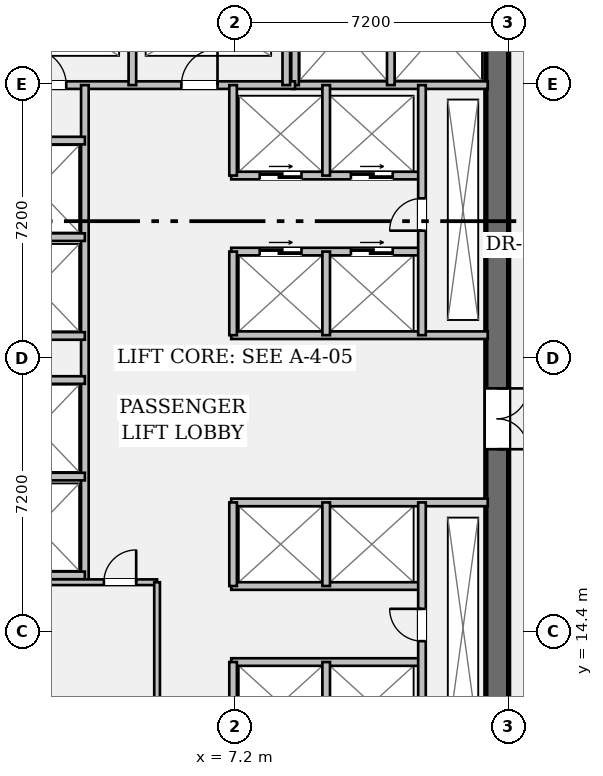
"""IFC4 building model, lengths in metres.
Left out: names, types, materials, properties, quantities, classifications, styles, units other than length and angle.
Written with IfcOpenShell. Run it as: python <this file> out.ifc"""

import sys

from ifc_helpers import new_model, si_unit, direction, frame, frame_2d, origin, place, context, subcontext, project, spatial, rectangle, extrude, element, fill, save


model = new_model("IFC4")
c1 = context("Model", 3, precision=1e-05, world=origin(), true_north=direction((0.0, 1.0)))
c2 = subcontext(c1, "Body", "Model", "MODEL_VIEW")
j1 = project(units=[si_unit("LENGTHUNIT", "METRE"), si_unit("PLANEANGLEUNIT", "RADIAN")], contexts=[c1])
p1 = place(None, origin())
s1 = spatial("IfcSite", under=j1, at=p1, CompositionType="ELEMENT")
p2 = place(p1, origin())
s2 = spatial("IfcBuilding", under=s1, at=p2, CompositionType="ELEMENT")
p3 = place(p2, frame((0.0, 0.0, 73.5)))
s3 = spatial("IfcBuildingStorey", under=s2, at=p3, CompositionType="ELEMENT", Elevation=73.5)
p4 = place(p3, frame((14.1, 35.4, 0.0), z_axis=(0.0, 0.0, 1.0), x_axis=(0.0, -1.0, 0.0)))
e1 = element("IfcWall", 1, at=p4, inside=s3, PredefinedType="SHEAR", context=c2, shape_type="SweptSolid", body=[
    extrude(rectangle(XDim=27.6, YDim=0.6, at=frame_2d((13.8, 0.0))), origin(), (0.0, 0.0, 1.0), 3.57),
])
p5 = place(p4, frame((1.3, 0.0, 0.0)))
e2 = element("IfcOpeningElement", 2, at=p5, cuts=e1, PredefinedType="OPENING", context=c2, shape_type="SweptSolid", body=[
    extrude(rectangle(XDim=1.2, YDim=2.15, at=frame_2d((0.6, 1.075))), frame((0.0, 0.312, 0.0), z_axis=(0.0, -1.0, 0.0), x_axis=(1.0, 0.0, 0.0)), (0.0, 0.0, 1.0), 0.624),
])
p6 = place(p4, frame((25.25, 0.0, 0.0)))
e3 = element("IfcOpeningElement", 3, at=p6, cuts=e1, PredefinedType="OPENING", context=c2, shape_type="SweptSolid", body=[
    extrude(rectangle(XDim=1.2, YDim=2.15, at=frame_2d((0.6, 1.075))), frame((0.0, 0.312, 0.0), z_axis=(0.0, -1.0, 0.0), x_axis=(1.0, 0.0, 0.0)), (0.0, 0.0, 1.0), 0.624),
])
p7 = place(p4, frame((14.6, 0.0, 0.0)))
e4 = element("IfcOpeningElement", 4, at=p7, cuts=e1, PredefinedType="OPENING", context=c2, shape_type="SweptSolid", body=[
    extrude(rectangle(XDim=1.6, YDim=2.2, at=frame_2d((0.8, 1.1))), frame((0.0, 0.312, 0.0), z_axis=(0.0, -1.0, 0.0), x_axis=(1.0, 0.0, 0.0)), (0.0, 0.0, 1.0), 0.624),
])
p8 = place(p3, frame((8.7, 28.78, 0.0), z_axis=(0.0, 0.0, 1.0), x_axis=(1.0, 0.0, 0.0)))
e5 = element("IfcWall", 5, at=p8, inside=s3, PredefinedType="PARTITIONING", context=c2, shape_type="SweptSolid", body=[
    extrude(rectangle(XDim=5.15, YDim=0.2, at=frame_2d((2.575, 0.0))), origin(), (0.0, 0.0, 1.0), 3.57),
])
for number, where, z_axis, x_axis in (
    (6, (8.78, 28.78, 0.0), (0.0, 0.0, 1.0), (0.0, 1.0, 0.0)),
    (7, (11.3, 28.78, 0.0), (0.0, 0.0, 1.0), (0.0, 1.0, 0.0)),
):
    element("IfcWall", number, at=place(p3, frame(where, z_axis=z_axis, x_axis=x_axis)), inside=s3, PredefinedType="PARTITIONING", context=c2, shape_type="SweptSolid", body=[
        extrude(rectangle(XDim=3.1, YDim=0.2, at=frame_2d((1.55, 0.0))), origin(), (0.0, 0.0, 1.0), 3.57),
    ])
p9 = place(p3, frame((0.6, 28.78, 0.0), z_axis=(0.0, 0.0, 1.0), x_axis=(1.0, 0.0, 0.0)))
e8 = element("IfcWall", 8, at=p9, inside=s3, PredefinedType="PARTITIONING", context=c2, shape_type="SweptSolid", body=[
    extrude(rectangle(XDim=8.18, YDim=0.2, at=frame_2d((4.09, 0.0))), origin(), (0.0, 0.0, 1.0), 3.57),
])
p10 = place(p9, frame((1.21, 0.0, 0.0)))
e9 = element("IfcOpeningElement", 9, at=p10, cuts=e8, PredefinedType="OPENING", context=c2, shape_type="SweptSolid", body=[
    extrude(rectangle(XDim=0.95, YDim=2.15, at=frame_2d((0.475, 1.075))), frame((0.0, 0.112, 0.0), z_axis=(0.0, -1.0, 0.0), x_axis=(1.0, 0.0, 0.0)), (0.0, 0.0, 1.0), 0.224),
])
p11 = place(p9, frame((5.19, 0.0, 0.0)))
e10 = element("IfcOpeningElement", 10, at=p11, cuts=e8, PredefinedType="OPENING", context=c2, shape_type="SweptSolid", body=[
    extrude(rectangle(XDim=0.95, YDim=2.15, at=frame_2d((0.475, 1.075))), frame((0.0, 0.112, 0.0), z_axis=(0.0, -1.0, 0.0), x_axis=(1.0, 0.0, 0.0)), (0.0, 0.0, 1.0), 0.224),
])
for number, where, z_axis, x_axis in (
    (11, (4.5, 28.78, 0.0), (0.0, 0.0, 1.0), (0.0, 1.0, 0.0)),
    (12, (8.55, 28.78, 0.0), (0.0, 0.0, 1.0), (0.0, 1.0, 0.0)),
):
    element("IfcWall", number, at=place(p3, frame(where, z_axis=z_axis, x_axis=x_axis)), inside=s3, PredefinedType="PARTITIONING", context=c2, shape_type="SweptSolid", body=[
        extrude(rectangle(XDim=2.94, YDim=0.2, at=frame_2d((1.47, 0.0))), origin(), (0.0, 0.0, 1.0), 3.57),
    ])
p12 = place(p3, frame((3.25, 15.7, 0.0), z_axis=(0.0, 0.0, 1.0), x_axis=(0.0, 1.0, 0.0)))
e13 = element("IfcWall", 13, at=p12, inside=s3, PredefinedType="PARTITIONING", context=c2, shape_type="SweptSolid", body=[
    extrude(rectangle(XDim=13.08, YDim=0.2, at=frame_2d((6.54, 0.0))), origin(), (0.0, 0.0, 1.0), 3.57),
])
for number, where, z_axis, x_axis in (
    (14, (0.6, 15.88, 0.0), (0.0, 0.0, 1.0), (1.0, 0.0, 0.0)),
    (15, (0.6, 18.48, 0.0), (0.0, 0.0, 1.0), (1.0, 0.0, 0.0)),
    (16, (0.6, 22.18, 0.0), (0.0, 0.0, 1.0), (1.0, 0.0, 0.0)),
    (17, (0.6, 24.78, 0.0), (0.0, 0.0, 1.0), (1.0, 0.0, 0.0)),
    (18, (0.6, 21.02, 0.0), (0.0, 0.0, 1.0), (1.0, 0.0, 0.0)),
    (19, (0.6, 27.32, 0.0), (0.0, 0.0, 1.0), (1.0, 0.0, 0.0)),
):
    element("IfcWall", number, at=place(p3, frame(where, z_axis=z_axis, x_axis=x_axis)), inside=s3, PredefinedType="PARTITIONING", context=c2, shape_type="SweptSolid", body=[
        extrude(rectangle(XDim=2.65, YDim=0.2, at=frame_2d((1.325, 0.0))), origin(), (0.0, 0.0, 1.0), 3.57),
    ])
p13 = place(p3, frame((7.1, 22.2, 0.0), z_axis=(0.0, 0.0, 1.0), x_axis=(1.0, 0.0, 0.0)))
e20 = element("IfcWall", 20, at=p13, inside=s3, PredefinedType="PARTITIONING", context=c2, shape_type="SweptSolid", body=[
    extrude(rectangle(XDim=6.75, YDim=0.2, at=frame_2d((3.375, 0.0))), origin(), (0.0, 0.0, 1.0), 3.57),
])
p14 = place(p3, frame((7.1, 24.4, 0.0), z_axis=(0.0, 0.0, 1.0), x_axis=(1.0, 0.0, 0.0)))
e21 = element("IfcWall", 21, at=p14, inside=s3, PredefinedType="PARTITIONING", context=c2, shape_type="SweptSolid", body=[
    extrude(rectangle(XDim=5.02, YDim=0.2, at=frame_2d((2.51, 0.0))), origin(), (0.0, 0.0, 1.0), 3.57),
])
p15 = place(p14, frame((0.75, 0.0, 0.0)))
e22 = element("IfcOpeningElement", 22, at=p15, cuts=e21, PredefinedType="OPENING", context=c2, shape_type="SweptSolid", body=[
    extrude(rectangle(XDim=1.1, YDim=2.2, at=frame_2d((0.55, 1.1))), frame((0.0, 0.112, 0.0), z_axis=(0.0, -1.0, 0.0), x_axis=(1.0, 0.0, 0.0)), (0.0, 0.0, 1.0), 0.224),
])
p16 = place(p14, frame((3.15, 0.0, 0.0)))
e23 = element("IfcOpeningElement", 23, at=p16, cuts=e21, PredefinedType="OPENING", context=c2, shape_type="SweptSolid", body=[
    extrude(rectangle(XDim=1.1, YDim=2.2, at=frame_2d((0.55, 1.1))), frame((0.0, 0.112, 0.0), z_axis=(0.0, -1.0, 0.0), x_axis=(1.0, 0.0, 0.0)), (0.0, 0.0, 1.0), 0.224),
])
p17 = place(p3, frame((7.1, 26.4, 0.0), z_axis=(0.0, 0.0, 1.0), x_axis=(1.0, 0.0, 0.0)))
e24 = element("IfcWall", 24, at=p17, inside=s3, PredefinedType="PARTITIONING", context=c2, shape_type="SweptSolid", body=[
    extrude(rectangle(XDim=5.02, YDim=0.2, at=frame_2d((2.51, 0.0))), origin(), (0.0, 0.0, 1.0), 3.57),
])
p18 = place(p17, frame((0.75, 0.0, 0.0)))
e25 = element("IfcOpeningElement", 25, at=p18, cuts=e24, PredefinedType="OPENING", context=c2, shape_type="SweptSolid", body=[
    extrude(rectangle(XDim=1.1, YDim=2.2, at=frame_2d((0.55, 1.1))), frame((0.0, 0.112, 0.0), z_axis=(0.0, -1.0, 0.0), x_axis=(1.0, 0.0, 0.0)), (0.0, 0.0, 1.0), 0.224),
])
p19 = place(p17, frame((3.15, 0.0, 0.0)))
e26 = element("IfcOpeningElement", 26, at=p19, cuts=e24, PredefinedType="OPENING", context=c2, shape_type="SweptSolid", body=[
    extrude(rectangle(XDim=1.1, YDim=2.2, at=frame_2d((0.55, 1.1))), frame((0.0, 0.112, 0.0), z_axis=(0.0, -1.0, 0.0), x_axis=(1.0, 0.0, 0.0)), (0.0, 0.0, 1.0), 0.224),
])
p20 = place(p3, frame((7.15, 22.2, 0.0), z_axis=(0.0, 0.0, 1.0), x_axis=(0.0, 1.0, 0.0)))
e27 = element("IfcWall", 27, at=p20, inside=s3, PredefinedType="PARTITIONING", context=c2, shape_type="SweptSolid", body=[
    extrude(rectangle(XDim=2.2, YDim=0.2, at=frame_2d((1.1, 0.0))), origin(), (0.0, 0.0, 1.0), 3.57),
])
p21 = place(p3, frame((7.15, 26.4, 0.0), z_axis=(0.0, 0.0, 1.0), x_axis=(0.0, 1.0, 0.0)))
e28 = element("IfcWall", 28, at=p21, inside=s3, PredefinedType="PARTITIONING", context=c2, shape_type="SweptSolid", body=[
    extrude(rectangle(XDim=2.38, YDim=0.2, at=frame_2d((1.19, 0.0))), origin(), (0.0, 0.0, 1.0), 3.57),
])
p22 = place(p3, frame((9.6, 22.2, 0.0), z_axis=(0.0, 0.0, 1.0), x_axis=(0.0, 1.0, 0.0)))
e29 = element("IfcWall", 29, at=p22, inside=s3, PredefinedType="PARTITIONING", context=c2, shape_type="SweptSolid", body=[
    extrude(rectangle(XDim=2.2, YDim=0.2, at=frame_2d((1.1, 0.0))), origin(), (0.0, 0.0, 1.0), 3.57),
])
p23 = place(p3, frame((9.6, 26.4, 0.0), z_axis=(0.0, 0.0, 1.0), x_axis=(0.0, 1.0, 0.0)))
e30 = element("IfcWall", 30, at=p23, inside=s3, PredefinedType="PARTITIONING", context=c2, shape_type="SweptSolid", body=[
    extrude(rectangle(XDim=2.38, YDim=0.2, at=frame_2d((1.19, 0.0))), origin(), (0.0, 0.0, 1.0), 3.57),
])
p24 = place(p3, frame((12.12, 22.2, 0.0), z_axis=(0.0, 0.0, 1.0), x_axis=(0.0, 1.0, 0.0)))
e31 = element("IfcWall", 31, at=p24, inside=s3, PredefinedType="PARTITIONING", context=c2, shape_type="SweptSolid", body=[
    extrude(rectangle(XDim=6.58, YDim=0.2, at=frame_2d((3.29, 0.0))), origin(), (0.0, 0.0, 1.0), 3.57),
])
p25 = place(p24, frame((2.75, 0.0, 0.0)))
e32 = element("IfcOpeningElement", 32, at=p25, cuts=e31, PredefinedType="OPENING", context=c2, shape_type="SweptSolid", body=[
    extrude(rectangle(XDim=0.85, YDim=2.15, at=frame_2d((0.425, 1.075))), frame((0.0, 0.112, 0.0), z_axis=(0.0, -1.0, 0.0), x_axis=(1.0, 0.0, 0.0)), (0.0, 0.0, 1.0), 0.224),
])
p26 = place(p3, frame((7.1, 17.8, 0.0), z_axis=(0.0, 0.0, 1.0), x_axis=(1.0, 0.0, 0.0)))
e33 = element("IfcWall", 33, at=p26, inside=s3, PredefinedType="PARTITIONING", context=c2, shape_type="SweptSolid", body=[
    extrude(rectangle(XDim=6.75, YDim=0.2, at=frame_2d((3.375, 0.0))), origin(), (0.0, 0.0, 1.0), 3.57),
])
for number, where, z_axis, x_axis in (
    (34, (7.1, 15.6, 0.0), (0.0, 0.0, 1.0), (1.0, 0.0, 0.0)),
    (35, (7.1, 13.6, 0.0), (0.0, 0.0, 1.0), (1.0, 0.0, 0.0)),
):
    element("IfcWall", number, at=place(p3, frame(where, z_axis=z_axis, x_axis=x_axis)), inside=s3, PredefinedType="PARTITIONING", context=c2, shape_type="SweptSolid", body=[
        extrude(rectangle(XDim=5.02, YDim=0.2, at=frame_2d((2.51, 0.0))), origin(), (0.0, 0.0, 1.0), 3.57),
    ])
p27 = place(p3, frame((7.15, 15.6, 0.0), z_axis=(0.0, 0.0, 1.0), x_axis=(0.0, 1.0, 0.0)))
e36 = element("IfcWall", 36, at=p27, inside=s3, PredefinedType="PARTITIONING", context=c2, shape_type="SweptSolid", body=[
    extrude(rectangle(XDim=2.2, YDim=0.2, at=frame_2d((1.1, 0.0))), origin(), (0.0, 0.0, 1.0), 3.57),
])
p28 = place(p3, frame((7.15, 11.2, 0.0), z_axis=(0.0, 0.0, 1.0), x_axis=(0.0, 1.0, 0.0)))
e37 = element("IfcWall", 37, at=p28, inside=s3, PredefinedType="PARTITIONING", context=c2, shape_type="SweptSolid", body=[
    extrude(rectangle(XDim=2.4, YDim=0.2, at=frame_2d((1.2, 0.0))), origin(), (0.0, 0.0, 1.0), 3.57),
])
p29 = place(p3, frame((9.6, 15.6, 0.0), z_axis=(0.0, 0.0, 1.0), x_axis=(0.0, 1.0, 0.0)))
e38 = element("IfcWall", 38, at=p29, inside=s3, PredefinedType="PARTITIONING", context=c2, shape_type="SweptSolid", body=[
    extrude(rectangle(XDim=2.2, YDim=0.2, at=frame_2d((1.1, 0.0))), origin(), (0.0, 0.0, 1.0), 3.57),
])
p30 = place(p3, frame((9.6, 11.2, 0.0), z_axis=(0.0, 0.0, 1.0), x_axis=(0.0, 1.0, 0.0)))
e39 = element("IfcWall", 39, at=p30, inside=s3, PredefinedType="PARTITIONING", context=c2, shape_type="SweptSolid", body=[
    extrude(rectangle(XDim=2.4, YDim=0.2, at=frame_2d((1.2, 0.0))), origin(), (0.0, 0.0, 1.0), 3.57),
])
p31 = place(p3, frame((12.12, 11.2, 0.0), z_axis=(0.0, 0.0, 1.0), x_axis=(0.0, 1.0, 0.0)))
e40 = element("IfcWall", 40, at=p31, inside=s3, PredefinedType="PARTITIONING", context=c2, shape_type="SweptSolid", body=[
    extrude(rectangle(XDim=6.6, YDim=0.2, at=frame_2d((3.3, 0.0))), origin(), (0.0, 0.0, 1.0), 3.57),
])
p32 = place(p31, frame((2.95, 0.0, 0.0)))
e41 = element("IfcOpeningElement", 41, at=p32, cuts=e40, PredefinedType="OPENING", context=c2, shape_type="SweptSolid", body=[
    extrude(rectangle(XDim=0.85, YDim=2.15, at=frame_2d((0.425, 1.075))), frame((0.0, 0.112, 0.0), z_axis=(0.0, -1.0, 0.0), x_axis=(1.0, 0.0, 0.0)), (0.0, 0.0, 1.0), 0.224),
])
p33 = place(p3, frame((0.6, 15.7, 0.0), z_axis=(0.0, 0.0, 1.0), x_axis=(1.0, 0.0, 0.0)))
e42 = element("IfcWall", 42, at=p33, inside=s3, PredefinedType="PARTITIONING", context=c2, shape_type="SweptSolid", body=[
    extrude(rectangle(XDim=4.55, YDim=0.15, at=frame_2d((2.275, 0.0))), origin(), (0.0, 0.0, 1.0), 3.57),
])
p34 = place(p33, frame((3.15, 0.0, 0.0)))
e43 = element("IfcOpeningElement", 43, at=p34, cuts=e42, PredefinedType="OPENING", context=c2, shape_type="SweptSolid", body=[
    extrude(rectangle(XDim=0.85, YDim=2.15, at=frame_2d((0.425, 1.075))), frame((0.0, 0.087, 0.0), z_axis=(0.0, -1.0, 0.0), x_axis=(1.0, 0.0, 0.0)), (0.0, 0.0, 1.0), 0.174),
])
p35 = place(p3, frame((5.15, 11.28, 0.0), z_axis=(0.0, 0.0, 1.0), x_axis=(0.0, 1.0, 0.0)))
e44 = element("IfcWall", 44, at=p35, inside=s3, PredefinedType="PARTITIONING", context=c2, shape_type="SweptSolid", body=[
    extrude(rectangle(XDim=4.42, YDim=0.15, at=frame_2d((2.21, 0.0))), origin(), (0.0, 0.0, 1.0), 3.57),
])
p36 = place(p10, origin())
e45 = element("IfcDoor", 45, at=p36, inside=s3, OperationType="SINGLE_SWING_LEFT", PredefinedType="DOOR", context=c2, shape_type="SweptSolid", body=[
    extrude(rectangle(XDim=0.95, YDim=2.15, at=frame_2d((0.475, 1.075))), frame((0.0, 0.025, 0.0), z_axis=(0.0, -1.0, 0.0), x_axis=(1.0, 0.0, 0.0)), (0.0, 0.0, 1.0), 0.05),
])
fill(e9, e45)
p37 = place(p11, origin())
e46 = element("IfcDoor", 46, at=p37, inside=s3, OperationType="SINGLE_SWING_RIGHT", PredefinedType="DOOR", context=c2, shape_type="SweptSolid", body=[
    extrude(rectangle(XDim=0.95, YDim=2.15, at=frame_2d((0.475, 1.075))), frame((0.0, 0.025, 0.0), z_axis=(0.0, -1.0, 0.0), x_axis=(1.0, 0.0, 0.0)), (0.0, 0.0, 1.0), 0.05),
])
fill(e10, e46)
p38 = place(p7, origin())
e47 = element("IfcDoor", 47, at=p38, inside=s3, OperationType="DOUBLE_DOOR_SINGLE_SWING", PredefinedType="DOOR", context=c2, shape_type="SweptSolid", body=[
    extrude(rectangle(XDim=1.6, YDim=2.2, at=frame_2d((0.8, 1.1))), frame((0.0, 0.025, 0.0), z_axis=(0.0, -1.0, 0.0), x_axis=(1.0, 0.0, 0.0)), (0.0, 0.0, 1.0), 0.05),
])
fill(e4, e47)
p39 = place(p25, origin())
e48 = element("IfcDoor", 48, at=p39, inside=s3, OperationType="SINGLE_SWING_LEFT", PredefinedType="DOOR", context=c2, shape_type="SweptSolid", body=[
    extrude(rectangle(XDim=0.85, YDim=2.15, at=frame_2d((0.425, 1.075))), frame((0.0, 0.025, 0.0), z_axis=(0.0, -1.0, 0.0), x_axis=(1.0, 0.0, 0.0)), (0.0, 0.0, 1.0), 0.05),
])
fill(e32, e48)
p40 = place(p15, origin())
e49 = element("IfcDoor", 49, at=p40, inside=s3, OperationType="DOUBLE_DOOR_SLIDING", PredefinedType="DOOR", context=c2, shape_type="SweptSolid", body=[
    extrude(rectangle(XDim=1.1, YDim=2.2, at=frame_2d((0.55, 1.1))), frame((0.0, 0.025, 0.0), z_axis=(0.0, -1.0, 0.0), x_axis=(1.0, 0.0, 0.0)), (0.0, 0.0, 1.0), 0.05),
])
fill(e22, e49)
p41 = place(p16, origin())
e50 = element("IfcDoor", 50, at=p41, inside=s3, OperationType="DOUBLE_DOOR_SLIDING", PredefinedType="DOOR", context=c2, shape_type="SweptSolid", body=[
    extrude(rectangle(XDim=1.1, YDim=2.2, at=frame_2d((0.55, 1.1))), frame((0.0, 0.025, 0.0), z_axis=(0.0, -1.0, 0.0), x_axis=(1.0, 0.0, 0.0)), (0.0, 0.0, 1.0), 0.05),
])
fill(e23, e50)
p42 = place(p18, origin())
e51 = element("IfcDoor", 51, at=p42, inside=s3, OperationType="DOUBLE_DOOR_SLIDING", PredefinedType="DOOR", context=c2, shape_type="SweptSolid", body=[
    extrude(rectangle(XDim=1.1, YDim=2.2, at=frame_2d((0.55, 1.1))), frame((0.0, 0.025, 0.0), z_axis=(0.0, -1.0, 0.0), x_axis=(1.0, 0.0, 0.0)), (0.0, 0.0, 1.0), 0.05),
])
fill(e25, e51)
p43 = place(p19, origin())
e52 = element("IfcDoor", 52, at=p43, inside=s3, OperationType="DOUBLE_DOOR_SLIDING", PredefinedType="DOOR", context=c2, shape_type="SweptSolid", body=[
    extrude(rectangle(XDim=1.1, YDim=2.2, at=frame_2d((0.55, 1.1))), frame((0.0, 0.025, 0.0), z_axis=(0.0, -1.0, 0.0), x_axis=(1.0, 0.0, 0.0)), (0.0, 0.0, 1.0), 0.05),
])
fill(e26, e52)
p44 = place(p32, origin())
e53 = element("IfcDoor", 53, at=p44, inside=s3, OperationType="SINGLE_SWING_RIGHT", PredefinedType="DOOR", context=c2, shape_type="SweptSolid", body=[
    extrude(rectangle(XDim=0.85, YDim=2.15, at=frame_2d((0.425, 1.075))), frame((0.0, 0.025, 0.0), z_axis=(0.0, -1.0, 0.0), x_axis=(1.0, 0.0, 0.0)), (0.0, 0.0, 1.0), 0.05),
])
fill(e41, e53)
p45 = place(p34, origin())
e54 = element("IfcDoor", 54, at=p45, inside=s3, OperationType="SINGLE_SWING_RIGHT", PredefinedType="DOOR", context=c2, shape_type="SweptSolid", body=[
    extrude(rectangle(XDim=0.85, YDim=2.15, at=frame_2d((0.425, 1.075))), frame((0.0, 0.025, 0.0), z_axis=(0.0, -1.0, 0.0), x_axis=(1.0, 0.0, 0.0)), (0.0, 0.0, 1.0), 0.05),
])
fill(e43, e54)
save(model, sys.argv[1])
